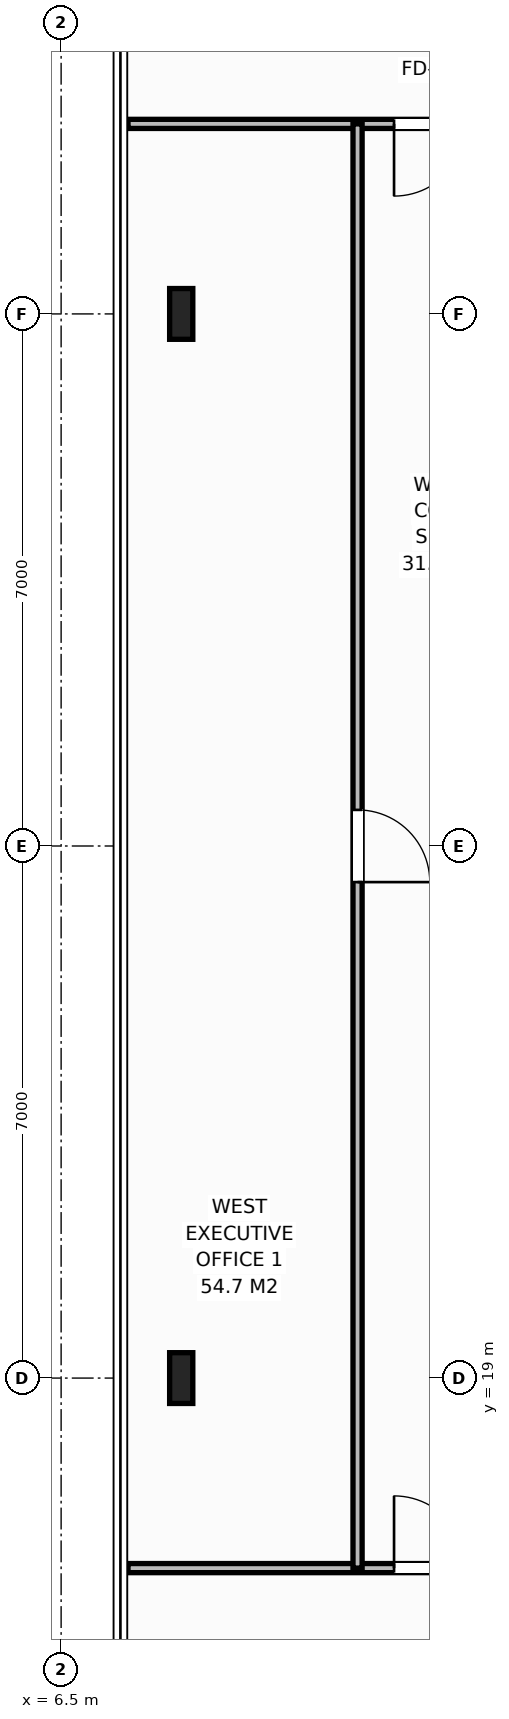
"""IFC4 building model, lengths in metres.
Left out: names, types, materials, properties, quantities, classifications, styles, units other than length and angle.
Written with IfcOpenShell. Run it as: python <this file> out.ifc"""

import sys

from ifc_helpers import new_model, si_unit, direction, frame, frame_2d, origin, origin_2d, place, context, subcontext, project, spatial, rectangle, i_section, extrude, element, fill, save


model = new_model("IFC4")
c1 = context("Model", 3, precision=1e-05, world=origin(), true_north=direction((0.0, 1.0)))
c2 = subcontext(c1, "Body", "Model", "MODEL_VIEW")
j1 = project(units=[si_unit("LENGTHUNIT", "METRE"), si_unit("PLANEANGLEUNIT", "RADIAN")], contexts=[c1])
p1 = place(None, origin())
s1 = spatial("IfcSite", under=j1, at=p1, CompositionType="ELEMENT")
p2 = place(p1, origin())
s2 = spatial("IfcBuilding", under=s1, at=p2, CompositionType="ELEMENT")
p3 = place(p2, frame((0.0, 0.0, 267.0)))
s3 = spatial("IfcBuildingStorey", under=s2, at=p3, CompositionType="ELEMENT", Elevation=267.0)
for number, where, z_axis, x_axis in (
    (1, (8.08, 19.0, 0.0), (0.0, 0.0, 1.0), (1.0, 0.0, 0.0)),
    (2, (8.08, 33.0, 0.0), (0.0, 0.0, 1.0), (1.0, 0.0, 0.0)),
):
    element("IfcColumn", number, at=place(p3, frame(where, z_axis=z_axis, x_axis=x_axis)), inside=s3, PredefinedType="COLUMN", context=c2, shape_type="SweptSolid", body=[
        extrude(i_section(OverallWidth=0.305, OverallDepth=0.668, WebThickness=0.021, FlangeThickness=0.04, at=origin_2d()), origin(), (0.0, 0.0, 1.0), 3.8),
    ])
p4 = place(p3, frame((7.38, 35.5, 0.0), z_axis=(0.0, 0.0, 1.0), x_axis=(1.0, 0.0, 0.0)))
e3 = element("IfcWall", 3, at=p4, inside=s3, PredefinedType="PARTITIONING", context=c2, shape_type="SweptSolid", body=[
    extrude(rectangle(XDim=10.074, YDim=0.12, at=frame_2d((5.037, 0.0))), origin(), (0.0, 0.0, 1.0), 3.588),
])
p5 = place(p4, frame((3.5, 0.0, 0.0)))
e4 = element("IfcOpeningElement", 4, at=p5, cuts=e3, PredefinedType="OPENING", context=c2, shape_type="SweptSolid", body=[
    extrude(rectangle(XDim=0.95, YDim=2.15, at=frame_2d((0.475, 1.075))), frame((0.0, 0.07, 0.0), z_axis=(0.0, -1.0, 0.0), x_axis=(1.0, 0.0, 0.0)), (0.0, 0.0, 1.0), 0.14),
])
p6 = place(p3, frame((7.38, 16.5, 0.0), z_axis=(0.0, 0.0, 1.0), x_axis=(1.0, 0.0, 0.0)))
e5 = element("IfcWall", 5, at=p6, inside=s3, PredefinedType="PARTITIONING", context=c2, shape_type="SweptSolid", body=[
    extrude(rectangle(XDim=5.76, YDim=0.12, at=frame_2d((2.88, 0.0))), origin(), (0.0, 0.0, 1.0), 3.588),
])
p7 = place(p6, frame((3.5, 0.0, 0.0)))
e6 = element("IfcOpeningElement", 6, at=p7, cuts=e5, PredefinedType="OPENING", context=c2, shape_type="SweptSolid", body=[
    extrude(rectangle(XDim=0.95, YDim=2.15, at=frame_2d((0.475, 1.075))), frame((0.0, 0.07, 0.0), z_axis=(0.0, -1.0, 0.0), x_axis=(1.0, 0.0, 0.0)), (0.0, 0.0, 1.0), 0.14),
])
p8 = place(p3, frame((10.4, 16.5, 0.0), z_axis=(0.0, 0.0, 1.0), x_axis=(0.0, 1.0, 0.0)))
e7 = element("IfcWall", 7, at=p8, inside=s3, PredefinedType="PARTITIONING", context=c2, shape_type="SweptSolid", body=[
    extrude(rectangle(XDim=19.0, YDim=0.12, at=frame_2d((9.5, 0.0))), origin(), (0.0, 0.0, 1.0), 3.588),
])
p9 = place(p8, frame((9.025, 0.0, 0.0)))
e8 = element("IfcOpeningElement", 8, at=p9, cuts=e7, PredefinedType="OPENING", context=c2, shape_type="SweptSolid", body=[
    extrude(rectangle(XDim=0.95, YDim=2.15, at=frame_2d((0.475, 1.075))), frame((0.0, 0.07, 0.0), z_axis=(0.0, -1.0, 0.0), x_axis=(1.0, 0.0, 0.0)), (0.0, 0.0, 1.0), 0.14),
])
p10 = place(p5, origin())
e9 = element("IfcDoor", 9, at=p10, inside=s3, OperationType="SINGLE_SWING_RIGHT", PredefinedType="DOOR", context=c2, shape_type="SweptSolid", body=[
    extrude(rectangle(XDim=0.95, YDim=2.15, at=frame_2d((0.475, 1.075))), frame((0.0, 0.025, 0.0), z_axis=(0.0, -1.0, 0.0), x_axis=(1.0, 0.0, 0.0)), (0.0, 0.0, 1.0), 0.05),
])
fill(e4, e9)
p11 = place(p7, origin())
e10 = element("IfcDoor", 10, at=p11, inside=s3, OperationType="SINGLE_SWING_LEFT", PredefinedType="DOOR", context=c2, shape_type="SweptSolid", body=[
    extrude(rectangle(XDim=0.95, YDim=2.15, at=frame_2d((0.475, 1.075))), frame((0.0, 0.025, 0.0), z_axis=(0.0, -1.0, 0.0), x_axis=(1.0, 0.0, 0.0)), (0.0, 0.0, 1.0), 0.05),
])
fill(e6, e10)
p12 = place(p9, origin())
e11 = element("IfcDoor", 11, at=p12, inside=s3, OperationType="SINGLE_SWING_RIGHT", PredefinedType="DOOR", context=c2, shape_type="SweptSolid", body=[
    extrude(rectangle(XDim=0.95, YDim=2.15, at=frame_2d((0.475, 1.075))), frame((0.0, 0.025, 0.0), z_axis=(0.0, -1.0, 0.0), x_axis=(1.0, 0.0, 0.0)), (0.0, 0.0, 1.0), 0.05),
])
fill(e8, e11)
save(model, sys.argv[1])
